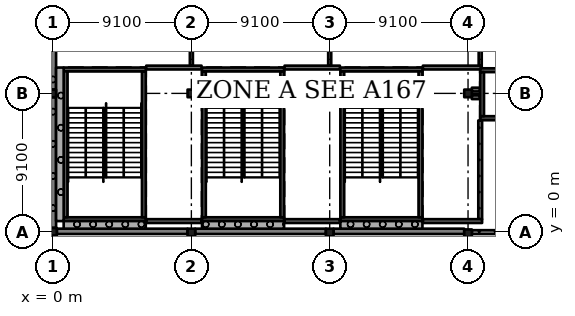
"""IFC4 building model, lengths in metres.
Left out: names, types, materials, properties, quantities, classifications, styles, units other than length and angle.
Written with IfcOpenShell. Run it as: python <this file> out.ifc"""

import sys

from ifc_helpers import new_model, si_unit, direction, frame, frame_2d, origin, origin_2d, place, context, subcontext, project, spatial, rectangle, extrude, element, fill, save


model = new_model("IFC4")
c1 = context("Model", 3, precision=1e-05, world=origin(), true_north=direction((0.0, 1.0)))
c2 = subcontext(c1, "Body", "Model", "MODEL_VIEW")
j1 = project(units=[si_unit("LENGTHUNIT", "METRE"), si_unit("PLANEANGLEUNIT", "RADIAN")], contexts=[c1])
p1 = place(None, origin())
s1 = spatial("IfcSite", under=j1, at=p1, CompositionType="ELEMENT")
p2 = place(p1, origin())
s2 = spatial("IfcBuilding", under=s1, at=p2, CompositionType="ELEMENT")
p3 = place(p2, frame((0.0, 0.0, 24.57)))
s3 = spatial("IfcBuildingStorey", under=s2, at=p3, CompositionType="ELEMENT", Elevation=24.57)
for number, where, z_axis, x_axis in (
    (1, (0.0, 0.0, 0.0), (0.0, 0.0, 1.0), (1.0, 0.0, 0.0)),
    (2, (-0.05, 9.1, 0.0), (0.0, 0.0, 1.0), (1.0, 0.0, 0.0)),
    (3, (9.1, -0.05, 0.0), (0.0, 0.0, 1.0), (1.0, 0.0, 0.0)),
    (4, (9.1, 9.1, 0.0), (0.0, 0.0, 1.0), (1.0, 0.0, 0.0)),
    (5, (18.2, -0.05, 0.0), (0.0, 0.0, 1.0), (1.0, 0.0, 0.0)),
    (6, (18.2, 9.1, 0.0), (0.0, 0.0, 1.0), (1.0, 0.0, 0.0)),
    (7, (27.3, -0.1, 0.0), (0.0, 0.0, 1.0), (1.0, 0.0, 0.0)),
    (8, (27.3, 9.1, 0.0), (0.0, 0.0, 1.0), (1.0, 0.0, 0.0)),
):
    element("IfcColumn", number, at=place(p3, frame(where, z_axis=z_axis, x_axis=x_axis)), inside=s3, PredefinedType="COLUMN", context=c2, shape_type="SweptSolid", body=[
        extrude(rectangle(XDim=0.5, YDim=0.5, at=origin_2d()), origin(), (0.0, 0.0, 1.0), 4.55),
    ])
p4 = place(p3, frame((30.7, 7.475, 0.0), z_axis=(0.0, 0.0, 1.0), x_axis=(-1.0, 0.0, 0.0)))
e9 = element("IfcWall", 9, at=p4, inside=s3, PredefinedType="SHEAR", context=c2, shape_type="SweptSolid", body=[
    extrude(rectangle(XDim=2.6, YDim=0.25, at=frame_2d((1.3, 0.0))), origin(), (0.0, 0.0, 1.0), 4.55),
])
p5 = place(p3, frame((30.7, 10.625, 0.0), z_axis=(0.0, 0.0, 1.0), x_axis=(-1.0, 0.0, 0.0)))
e10 = element("IfcWall", 10, at=p5, inside=s3, PredefinedType="SHEAR", context=c2, shape_type="SweptSolid", body=[
    extrude(rectangle(XDim=2.6, YDim=0.25, at=frame_2d((1.3, 0.0))), origin(), (0.0, 0.0, 1.0), 4.55),
])
p6 = place(p5, frame((0.8, 0.0, 0.0)))
e11 = element("IfcOpeningElement", 11, at=p6, cuts=e10, PredefinedType="OPENING", context=c2, shape_type="SweptSolid", body=[
    extrude(rectangle(XDim=1.0, YDim=2.1, at=frame_2d((0.5, 1.05))), frame((0.0, 0.135, 0.0), z_axis=(0.0, -1.0, 0.0), x_axis=(1.0, 0.0, 0.0)), (0.0, 0.0, 1.0), 0.27),
])
p7 = place(p3, frame((28.225, 10.5, 0.0), z_axis=(0.0, 0.0, 1.0), x_axis=(0.0, -1.0, 0.0)))
e12 = element("IfcWall", 12, at=p7, inside=s3, PredefinedType="SHEAR", context=c2, shape_type="SweptSolid", body=[
    extrude(rectangle(XDim=2.9, YDim=0.25, at=frame_2d((1.45, 0.0))), origin(), (0.0, 0.0, 1.0), 4.55),
])
p8 = place(p3, frame((6.1, 0.825, 0.0), z_axis=(0.0, 0.0, 1.0), x_axis=(-1.0, 0.0, 0.0)))
e13 = element("IfcWall", 13, at=p8, inside=s3, PredefinedType="SHEAR", context=c2, shape_type="SweptSolid", body=[
    extrude(rectangle(XDim=5.4, YDim=0.25, at=frame_2d((2.7, 0.0))), origin(), (0.0, 0.0, 1.0), 4.55),
])
p9 = place(p3, frame((6.1, 10.675, 0.0), z_axis=(0.0, 0.0, 1.0), x_axis=(-1.0, 0.0, 0.0)))
e14 = element("IfcWall", 14, at=p9, inside=s3, PredefinedType="SHEAR", context=c2, shape_type="SweptSolid", body=[
    extrude(rectangle(XDim=5.4, YDim=0.25, at=frame_2d((2.7, 0.0))), origin(), (0.0, 0.0, 1.0), 4.55),
])
p10 = place(p9, frame((1.5, 0.0, 0.0)))
e15 = element("IfcOpeningElement", 15, at=p10, cuts=e14, PredefinedType="OPENING", context=c2, shape_type="SweptSolid", body=[
    extrude(rectangle(XDim=2.4, YDim=2.1, at=frame_2d((1.2, 1.05))), frame((0.0, 0.135, 0.0), z_axis=(0.0, -1.0, 0.0), x_axis=(1.0, 0.0, 0.0)), (0.0, 0.0, 1.0), 0.27),
])
for number, where, z_axis, x_axis in (
    (16, (0.825, 10.55, 0.0), (0.0, 0.0, 1.0), (0.0, -1.0, 0.0)),
    (17, (5.975, 10.55, 0.0), (0.0, 0.0, 1.0), (0.0, -1.0, 0.0)),
):
    element("IfcWall", number, at=place(p3, frame(where, z_axis=z_axis, x_axis=x_axis)), inside=s3, PredefinedType="SHEAR", context=c2, shape_type="SweptSolid", body=[
        extrude(rectangle(XDim=9.6, YDim=0.25, at=frame_2d((4.8, 0.0))), origin(), (0.0, 0.0, 1.0), 4.55),
    ])
p11 = place(p3, frame((15.2, 0.825, 0.0), z_axis=(0.0, 0.0, 1.0), x_axis=(-1.0, 0.0, 0.0)))
e18 = element("IfcWall", 18, at=p11, inside=s3, PredefinedType="SHEAR", context=c2, shape_type="SweptSolid", body=[
    extrude(rectangle(XDim=5.4, YDim=0.25, at=frame_2d((2.7, 0.0))), origin(), (0.0, 0.0, 1.0), 4.55),
])
p12 = place(p3, frame((15.2, 10.675, 0.0), z_axis=(0.0, 0.0, 1.0), x_axis=(-1.0, 0.0, 0.0)))
e19 = element("IfcWall", 19, at=p12, inside=s3, PredefinedType="SHEAR", context=c2, shape_type="SweptSolid", body=[
    extrude(rectangle(XDim=5.4, YDim=0.25, at=frame_2d((2.7, 0.0))), origin(), (0.0, 0.0, 1.0), 4.55),
])
p13 = place(p12, frame((1.5, 0.0, 0.0)))
e20 = element("IfcOpeningElement", 20, at=p13, cuts=e19, PredefinedType="OPENING", context=c2, shape_type="SweptSolid", body=[
    extrude(rectangle(XDim=2.4, YDim=2.1, at=frame_2d((1.2, 1.05))), frame((0.0, 0.135, 0.0), z_axis=(0.0, -1.0, 0.0), x_axis=(1.0, 0.0, 0.0)), (0.0, 0.0, 1.0), 0.27),
])
for number, where, z_axis, x_axis in (
    (21, (9.925, 10.55, 0.0), (0.0, 0.0, 1.0), (0.0, -1.0, 0.0)),
    (22, (15.075, 10.55, 0.0), (0.0, 0.0, 1.0), (0.0, -1.0, 0.0)),
):
    element("IfcWall", number, at=place(p3, frame(where, z_axis=z_axis, x_axis=x_axis)), inside=s3, PredefinedType="SHEAR", context=c2, shape_type="SweptSolid", body=[
        extrude(rectangle(XDim=9.6, YDim=0.25, at=frame_2d((4.8, 0.0))), origin(), (0.0, 0.0, 1.0), 4.55),
    ])
p14 = place(p3, frame((24.3, 0.825, 0.0), z_axis=(0.0, 0.0, 1.0), x_axis=(-1.0, 0.0, 0.0)))
e23 = element("IfcWall", 23, at=p14, inside=s3, PredefinedType="SHEAR", context=c2, shape_type="SweptSolid", body=[
    extrude(rectangle(XDim=5.4, YDim=0.25, at=frame_2d((2.7, 0.0))), origin(), (0.0, 0.0, 1.0), 4.55),
])
p15 = place(p3, frame((24.3, 10.675, 0.0), z_axis=(0.0, 0.0, 1.0), x_axis=(-1.0, 0.0, 0.0)))
e24 = element("IfcWall", 24, at=p15, inside=s3, PredefinedType="SHEAR", context=c2, shape_type="SweptSolid", body=[
    extrude(rectangle(XDim=5.4, YDim=0.25, at=frame_2d((2.7, 0.0))), origin(), (0.0, 0.0, 1.0), 4.55),
])
p16 = place(p15, frame((1.5, 0.0, 0.0)))
e25 = element("IfcOpeningElement", 25, at=p16, cuts=e24, PredefinedType="OPENING", context=c2, shape_type="SweptSolid", body=[
    extrude(rectangle(XDim=2.4, YDim=2.1, at=frame_2d((1.2, 1.05))), frame((0.0, 0.135, 0.0), z_axis=(0.0, -1.0, 0.0), x_axis=(1.0, 0.0, 0.0)), (0.0, 0.0, 1.0), 0.27),
])
for number, where, z_axis, x_axis in (
    (26, (19.025, 10.55, 0.0), (0.0, 0.0, 1.0), (0.0, -1.0, 0.0)),
    (27, (24.175, 10.55, 0.0), (0.0, 0.0, 1.0), (0.0, -1.0, 0.0)),
):
    element("IfcWall", number, at=place(p3, frame(where, z_axis=z_axis, x_axis=x_axis)), inside=s3, PredefinedType="SHEAR", context=c2, shape_type="SweptSolid", body=[
        extrude(rectangle(XDim=9.6, YDim=0.25, at=frame_2d((4.8, 0.0))), origin(), (0.0, 0.0, 1.0), 4.55),
    ])
p17 = place(p3, frame((0.25, 0.025, 0.0), z_axis=(0.0, 0.0, 1.0), x_axis=(1.0, 0.0, 0.0)))
e28 = element("IfcWall", 28, at=p17, inside=s3, PredefinedType="SOLIDWALL", context=c2, shape_type="SweptSolid", body=[
    extrude(rectangle(XDim=8.6, YDim=0.35, at=frame_2d((4.3, 0.0))), origin(), (0.0, 0.0, 1.0), 3.6),
])
p18 = place(p3, frame((9.35, 0.025, 0.0), z_axis=(0.0, 0.0, 1.0), x_axis=(1.0, 0.0, 0.0)))
e29 = element("IfcWall", 29, at=p18, inside=s3, PredefinedType="SOLIDWALL", context=c2, shape_type="SweptSolid", body=[
    extrude(rectangle(XDim=8.6, YDim=0.35, at=frame_2d((4.3, 0.0))), origin(), (0.0, 0.0, 1.0), 3.6),
])
p19 = place(p3, frame((18.45, 0.025, 0.0), z_axis=(0.0, 0.0, 1.0), x_axis=(1.0, 0.0, 0.0)))
e30 = element("IfcWall", 30, at=p19, inside=s3, PredefinedType="SOLIDWALL", context=c2, shape_type="SweptSolid", body=[
    extrude(rectangle(XDim=8.6, YDim=0.35, at=frame_2d((4.3, 0.0))), origin(), (0.0, 0.0, 1.0), 3.6),
])
p20 = place(p3, frame((27.55, -0.025, 0.0), z_axis=(0.0, 0.0, 1.0), x_axis=(1.0, 0.0, 0.0)))
e31 = element("IfcWall", 31, at=p20, inside=s3, PredefinedType="SOLIDWALL", context=c2, shape_type="SweptSolid", body=[
    extrude(rectangle(XDim=8.6, YDim=0.25, at=frame_2d((4.3, 0.0))), origin(), (0.0, 0.0, 1.0), 3.6),
])
p21 = place(p3, frame((0.025, 17.95, 0.0), z_axis=(0.0, 0.0, 1.0), x_axis=(0.0, -1.0, 0.0)))
e32 = element("IfcWall", 32, at=p21, inside=s3, PredefinedType="SOLIDWALL", context=c2, shape_type="SweptSolid", body=[
    extrude(rectangle(XDim=8.6, YDim=0.35, at=frame_2d((4.3, 0.0))), origin(), (0.0, 0.0, 1.0), 3.6),
])
p22 = place(p3, frame((0.025, 8.85, 0.0), z_axis=(0.0, 0.0, 1.0), x_axis=(0.0, -1.0, 0.0)))
e33 = element("IfcWall", 33, at=p22, inside=s3, PredefinedType="SOLIDWALL", context=c2, shape_type="SweptSolid", body=[
    extrude(rectangle(XDim=8.6, YDim=0.35, at=frame_2d((4.3, 0.0))), origin(), (0.0, 0.0, 1.0), 3.6),
])
p23 = place(p3, frame((0.7, 0.45, 0.0), z_axis=(0.0, 0.0, 1.0), x_axis=(1.0, 0.0, 0.0)))
e34 = element("IfcWall", 34, at=p23, inside=s3, PredefinedType="SOLIDWALL", context=c2, shape_type="SweptSolid", body=[
    extrude(rectangle(XDim=5.4, YDim=0.5, at=frame_2d((2.7, 0.0))), origin(), (0.0, 0.0, 1.0), 4.35),
])
p24 = place(p3, frame((0.45, 0.7, 0.0), z_axis=(0.0, 0.0, 1.0), x_axis=(0.0, 1.0, 0.0)))
e35 = element("IfcWall", 35, at=p24, inside=s3, PredefinedType="SOLIDWALL", context=c2, shape_type="SweptSolid", body=[
    extrude(rectangle(XDim=10.1, YDim=0.5, at=frame_2d((5.05, 0.0))), origin(), (0.0, 0.0, 1.0), 4.35),
])
p25 = place(p3, frame((9.8, 0.45, 0.0), z_axis=(0.0, 0.0, 1.0), x_axis=(1.0, 0.0, 0.0)))
e36 = element("IfcWall", 36, at=p25, inside=s3, PredefinedType="SOLIDWALL", context=c2, shape_type="SweptSolid", body=[
    extrude(rectangle(XDim=5.4, YDim=0.5, at=frame_2d((2.7, 0.0))), origin(), (0.0, 0.0, 1.0), 4.35),
])
p26 = place(p3, frame((18.9, 0.45, 0.0), z_axis=(0.0, 0.0, 1.0), x_axis=(1.0, 0.0, 0.0)))
e37 = element("IfcWall", 37, at=p26, inside=s3, PredefinedType="SOLIDWALL", context=c2, shape_type="SweptSolid", body=[
    extrude(rectangle(XDim=5.4, YDim=0.5, at=frame_2d((2.7, 0.0))), origin(), (0.0, 0.0, 1.0), 4.35),
])
p27 = place(p3, frame((6.13, 10.8, 0.0), z_axis=(0.0, 0.0, 1.0), x_axis=(1.0, 0.0, 0.0)))
e38 = element("IfcWall", 38, at=p27, inside=s3, PredefinedType="SOLIDWALL", context=c2, shape_type="SweptSolid", body=[
    extrude(rectangle(XDim=3.64, YDim=0.25, at=frame_2d((1.82, 0.0))), origin(), (0.0, 0.0, 1.0), 4.35),
])
p28 = place(p27, frame((1.02, 0.0, 0.0)))
e39 = element("IfcOpeningElement", 39, at=p28, cuts=e38, PredefinedType="OPENING", context=c2, shape_type="SweptSolid", body=[
    extrude(rectangle(XDim=1.0, YDim=2.1, at=frame_2d((0.5, 1.05))), frame((0.0, 0.135, 0.0), z_axis=(0.0, -1.0, 0.0), x_axis=(1.0, 0.0, 0.0)), (0.0, 0.0, 1.0), 0.27),
])
p29 = place(p3, frame((9.1, 17.95, 0.0), z_axis=(0.0, 0.0, 1.0), x_axis=(0.0, -1.0, 0.0)))
e40 = element("IfcWall", 40, at=p29, inside=s3, PredefinedType="PARTITIONING", context=c2, shape_type="SweptSolid", body=[
    extrude(rectangle(XDim=7.025, YDim=0.2, at=frame_2d((3.512, 0.0))), origin(), (0.0, 0.0, 1.0), 3.6),
])
p30 = place(p29, frame((0.85, 0.0, 0.0)))
e41 = element("IfcOpeningElement", 41, at=p30, cuts=e40, PredefinedType="OPENING", context=c2, shape_type="SweptSolid", body=[
    extrude(rectangle(XDim=1.8, YDim=2.4, at=frame_2d((0.9, 1.2))), frame((0.0, 0.11, 0.0), z_axis=(0.0, -1.0, 0.0), x_axis=(1.0, 0.0, 0.0)), (0.0, 0.0, 1.0), 0.22),
])
p31 = place(p29, frame((4.35, 0.0, 0.0)))
e42 = element("IfcOpeningElement", 42, at=p31, cuts=e40, PredefinedType="OPENING", context=c2, shape_type="SweptSolid", body=[
    extrude(rectangle(XDim=1.8, YDim=2.4, at=frame_2d((0.9, 1.2))), frame((0.0, 0.11, 0.0), z_axis=(0.0, -1.0, 0.0), x_axis=(1.0, 0.0, 0.0)), (0.0, 0.0, 1.0), 0.22),
])
p32 = place(p3, frame((9.35, 8.85, 0.0), z_axis=(0.0, 0.0, 1.0), x_axis=(1.0, 0.0, 0.0)))
e43 = element("IfcWall", 43, at=p32, inside=s3, PredefinedType="SOLIDWALL", context=c2, shape_type="SweptSolid", body=[
    extrude(rectangle(XDim=0.42, YDim=0.25, at=frame_2d((0.21, 0.0))), origin(), (0.0, 0.0, 1.0), 4.35),
])
p33 = place(p3, frame((9.77, 0.7, 0.0), z_axis=(0.0, 0.0, 1.0), x_axis=(-1.0, 0.0, 0.0)))
e44 = element("IfcWall", 44, at=p33, inside=s3, PredefinedType="SOLIDWALL", context=c2, shape_type="SweptSolid", body=[
    extrude(rectangle(XDim=3.64, YDim=0.25, at=frame_2d((1.82, 0.0))), origin(), (0.0, 0.0, 1.0), 4.35),
])
p34 = place(p3, frame((9.77, 9.35, 0.0), z_axis=(0.0, 0.0, 1.0), x_axis=(-1.0, 0.0, 0.0)))
e45 = element("IfcWall", 45, at=p34, inside=s3, PredefinedType="SOLIDWALL", context=c2, shape_type="SweptSolid", body=[
    extrude(rectangle(XDim=0.42, YDim=0.25, at=frame_2d((0.21, 0.0))), origin(), (0.0, 0.0, 1.0), 4.35),
])
p35 = place(p3, frame((15.23, 10.8, 0.0), z_axis=(0.0, 0.0, 1.0), x_axis=(1.0, 0.0, 0.0)))
e46 = element("IfcWall", 46, at=p35, inside=s3, PredefinedType="SOLIDWALL", context=c2, shape_type="SweptSolid", body=[
    extrude(rectangle(XDim=3.64, YDim=0.25, at=frame_2d((1.82, 0.0))), origin(), (0.0, 0.0, 1.0), 4.35),
])
p36 = place(p35, frame((1.12, 0.0, 0.0)))
e47 = element("IfcOpeningElement", 47, at=p36, cuts=e46, PredefinedType="OPENING", context=c2, shape_type="SweptSolid", body=[
    extrude(rectangle(XDim=0.8, YDim=2.1, at=frame_2d((0.4, 1.05))), frame((0.0, 0.135, 0.0), z_axis=(0.0, -1.0, 0.0), x_axis=(1.0, 0.0, 0.0)), (0.0, 0.0, 1.0), 0.27),
])
p37 = place(p3, frame((18.2, 17.95, 0.0), z_axis=(0.0, 0.0, 1.0), x_axis=(0.0, -1.0, 0.0)))
e48 = element("IfcWall", 48, at=p37, inside=s3, PredefinedType="PARTITIONING", context=c2, shape_type="SweptSolid", body=[
    extrude(rectangle(XDim=7.025, YDim=0.2, at=frame_2d((3.512, 0.0))), origin(), (0.0, 0.0, 1.0), 3.6),
])
p38 = place(p37, frame((0.85, 0.0, 0.0)))
e49 = element("IfcOpeningElement", 49, at=p38, cuts=e48, PredefinedType="OPENING", context=c2, shape_type="SweptSolid", body=[
    extrude(rectangle(XDim=1.8, YDim=2.4, at=frame_2d((0.9, 1.2))), frame((0.0, 0.11, 0.0), z_axis=(0.0, -1.0, 0.0), x_axis=(1.0, 0.0, 0.0)), (0.0, 0.0, 1.0), 0.22),
])
p39 = place(p37, frame((4.35, 0.0, 0.0)))
e50 = element("IfcOpeningElement", 50, at=p39, cuts=e48, PredefinedType="OPENING", context=c2, shape_type="SweptSolid", body=[
    extrude(rectangle(XDim=1.8, YDim=2.4, at=frame_2d((0.9, 1.2))), frame((0.0, 0.11, 0.0), z_axis=(0.0, -1.0, 0.0), x_axis=(1.0, 0.0, 0.0)), (0.0, 0.0, 1.0), 0.22),
])
p40 = place(p3, frame((18.45, 8.85, 0.0), z_axis=(0.0, 0.0, 1.0), x_axis=(1.0, 0.0, 0.0)))
e51 = element("IfcWall", 51, at=p40, inside=s3, PredefinedType="SOLIDWALL", context=c2, shape_type="SweptSolid", body=[
    extrude(rectangle(XDim=0.42, YDim=0.25, at=frame_2d((0.21, 0.0))), origin(), (0.0, 0.0, 1.0), 4.35),
])
p41 = place(p3, frame((18.87, 0.7, 0.0), z_axis=(0.0, 0.0, 1.0), x_axis=(-1.0, 0.0, 0.0)))
e52 = element("IfcWall", 52, at=p41, inside=s3, PredefinedType="SOLIDWALL", context=c2, shape_type="SweptSolid", body=[
    extrude(rectangle(XDim=3.64, YDim=0.25, at=frame_2d((1.82, 0.0))), origin(), (0.0, 0.0, 1.0), 4.35),
])
p42 = place(p3, frame((18.87, 9.35, 0.0), z_axis=(0.0, 0.0, 1.0), x_axis=(-1.0, 0.0, 0.0)))
e53 = element("IfcWall", 53, at=p42, inside=s3, PredefinedType="SOLIDWALL", context=c2, shape_type="SweptSolid", body=[
    extrude(rectangle(XDim=0.42, YDim=0.25, at=frame_2d((0.21, 0.0))), origin(), (0.0, 0.0, 1.0), 4.35),
])
for number, where, z_axis, x_axis in (
    (54, (27.55, 8.85, 0.0), (0.0, 0.0, 1.0), (1.0, 0.0, 0.0)),
    (55, (28.07, 9.35, 0.0), (0.0, 0.0, 1.0), (-1.0, 0.0, 0.0)),
):
    element("IfcWall", number, at=place(p3, frame(where, z_axis=z_axis, x_axis=x_axis)), inside=s3, PredefinedType="SOLIDWALL", context=c2, shape_type="SweptSolid", body=[
        extrude(rectangle(XDim=0.52, YDim=0.25, at=frame_2d((0.26, 0.0))), origin(), (0.0, 0.0, 1.0), 4.35),
    ])
p43 = place(p3, frame((28.1, 7.32, 0.0), z_axis=(0.0, 0.0, 1.0), x_axis=(0.0, -1.0, 0.0)))
e56 = element("IfcWall", 56, at=p43, inside=s3, PredefinedType="SOLIDWALL", context=c2, shape_type="SweptSolid", body=[
    extrude(rectangle(XDim=6.495, YDim=0.25, at=frame_2d((3.248, 0.0))), origin(), (0.0, 0.0, 1.0), 4.35),
])
p44 = place(p3, frame((28.1, 13.7, 0.0), z_axis=(0.0, 0.0, 1.0), x_axis=(0.0, -1.0, 0.0)))
e57 = element("IfcWall", 57, at=p44, inside=s3, PredefinedType="PARTITIONING", context=c2, shape_type="SweptSolid", body=[
    extrude(rectangle(XDim=2.775, YDim=0.2, at=frame_2d((1.387, 0.0))), origin(), (0.0, 0.0, 1.0), 4.35),
])
p45 = place(p44, frame((0.45, 0.0, 0.0)))
e58 = element("IfcOpeningElement", 58, at=p45, cuts=e57, PredefinedType="OPENING", context=c2, shape_type="SweptSolid", body=[
    extrude(rectangle(XDim=1.8, YDim=2.4, at=frame_2d((0.9, 1.2))), frame((0.0, 0.11, 0.0), z_axis=(0.0, -1.0, 0.0), x_axis=(1.0, 0.0, 0.0)), (0.0, 0.0, 1.0), 0.22),
])
p46 = place(p3, frame((28.2, 10.8, 0.0), z_axis=(0.0, 0.0, 1.0), x_axis=(-1.0, 0.0, 0.0)))
e59 = element("IfcWall", 59, at=p46, inside=s3, PredefinedType="SOLIDWALL", context=c2, shape_type="SweptSolid", body=[
    extrude(rectangle(XDim=3.87, YDim=0.25, at=frame_2d((1.935, 0.0))), origin(), (0.0, 0.0, 1.0), 4.35),
])
p47 = place(p46, frame((1.45, 0.0, 0.0)))
e60 = element("IfcOpeningElement", 60, at=p47, cuts=e59, PredefinedType="OPENING", context=c2, shape_type="SweptSolid", body=[
    extrude(rectangle(XDim=1.0, YDim=2.1, at=frame_2d((0.5, 1.05))), frame((0.0, 0.135, 0.0), z_axis=(0.0, -1.0, 0.0), x_axis=(1.0, 0.0, 0.0)), (0.0, 0.0, 1.0), 0.27),
])
p48 = place(p3, frame((28.225, 0.7, 0.0), z_axis=(0.0, 0.0, 1.0), x_axis=(-1.0, 0.0, 0.0)))
e61 = element("IfcWall", 61, at=p48, inside=s3, PredefinedType="SOLIDWALL", context=c2, shape_type="SweptSolid", body=[
    extrude(rectangle(XDim=3.895, YDim=0.25, at=frame_2d((1.948, 0.0))), origin(), (0.0, 0.0, 1.0), 4.35),
])
p49 = place(p28, origin())
e62 = element("IfcDoor", 62, at=p49, inside=s3, OperationType="SINGLE_SWING_RIGHT", PredefinedType="DOOR", context=c2, shape_type="SweptSolid", body=[
    extrude(rectangle(XDim=1.0, YDim=2.1, at=frame_2d((0.5, 1.05))), frame((0.0, 0.025, 0.0), z_axis=(0.0, -1.0, 0.0), x_axis=(1.0, 0.0, 0.0)), (0.0, 0.0, 1.0), 0.05),
])
fill(e39, e62)
p50 = place(p36, origin())
e63 = element("IfcDoor", 63, at=p50, inside=s3, OperationType="SINGLE_SWING_RIGHT", PredefinedType="DOOR", context=c2, shape_type="SweptSolid", body=[
    extrude(rectangle(XDim=0.8, YDim=2.1, at=frame_2d((0.4, 1.05))), frame((0.0, 0.025, 0.0), z_axis=(0.0, -1.0, 0.0), x_axis=(1.0, 0.0, 0.0)), (0.0, 0.0, 1.0), 0.05),
])
fill(e47, e63)
p51 = place(p47, origin())
e64 = element("IfcDoor", 64, at=p51, inside=s3, OperationType="SINGLE_SWING_LEFT", PredefinedType="DOOR", context=c2, shape_type="SweptSolid", body=[
    extrude(rectangle(XDim=1.0, YDim=2.1, at=frame_2d((0.5, 1.05))), frame((0.0, 0.025, 0.0), z_axis=(0.0, -1.0, 0.0), x_axis=(1.0, 0.0, 0.0)), (0.0, 0.0, 1.0), 0.05),
])
fill(e60, e64)
p52 = place(p31, origin())
e65 = element("IfcDoor", 65, at=p52, inside=s3, OperationType="DOUBLE_DOOR_SINGLE_SWING", PredefinedType="DOOR", context=c2, shape_type="SweptSolid", body=[
    extrude(rectangle(XDim=1.8, YDim=2.4, at=frame_2d((0.9, 1.2))), frame((0.0, 0.025, 0.0), z_axis=(0.0, -1.0, 0.0), x_axis=(1.0, 0.0, 0.0)), (0.0, 0.0, 1.0), 0.05),
])
fill(e42, e65)
p53 = place(p39, origin())
e66 = element("IfcDoor", 66, at=p53, inside=s3, OperationType="DOUBLE_DOOR_SINGLE_SWING", PredefinedType="DOOR", context=c2, shape_type="SweptSolid", body=[
    extrude(rectangle(XDim=1.8, YDim=2.4, at=frame_2d((0.9, 1.2))), frame((0.0, 0.025, 0.0), z_axis=(0.0, -1.0, 0.0), x_axis=(1.0, 0.0, 0.0)), (0.0, 0.0, 1.0), 0.05),
])
fill(e50, e66)
p54 = place(p45, origin())
e67 = element("IfcDoor", 67, at=p54, inside=s3, OperationType="DOUBLE_DOOR_SINGLE_SWING", PredefinedType="DOOR", context=c2, shape_type="SweptSolid", body=[
    extrude(rectangle(XDim=1.8, YDim=2.4, at=frame_2d((0.9, 1.2))), frame((0.0, 0.025, 0.0), z_axis=(0.0, -1.0, 0.0), x_axis=(1.0, 0.0, 0.0)), (0.0, 0.0, 1.0), 0.05),
])
fill(e58, e67)
p55 = place(p10, origin())
e68 = element("IfcDoor", 68, at=p55, inside=s3, OperationType="DOUBLE_DOOR_SINGLE_SWING", PredefinedType="DOOR", context=c2, shape_type="SweptSolid", body=[
    extrude(rectangle(XDim=2.4, YDim=2.1, at=frame_2d((1.2, 1.05))), frame((0.0, 0.025, 0.0), z_axis=(0.0, -1.0, 0.0), x_axis=(1.0, 0.0, 0.0)), (0.0, 0.0, 1.0), 0.05),
])
fill(e15, e68)
p56 = place(p13, origin())
e69 = element("IfcDoor", 69, at=p56, inside=s3, OperationType="DOUBLE_DOOR_SINGLE_SWING", PredefinedType="DOOR", context=c2, shape_type="SweptSolid", body=[
    extrude(rectangle(XDim=2.4, YDim=2.1, at=frame_2d((1.2, 1.05))), frame((0.0, 0.025, 0.0), z_axis=(0.0, -1.0, 0.0), x_axis=(1.0, 0.0, 0.0)), (0.0, 0.0, 1.0), 0.05),
])
fill(e20, e69)
p57 = place(p16, origin())
e70 = element("IfcDoor", 70, at=p57, inside=s3, OperationType="DOUBLE_DOOR_SINGLE_SWING", PredefinedType="DOOR", context=c2, shape_type="SweptSolid", body=[
    extrude(rectangle(XDim=2.4, YDim=2.1, at=frame_2d((1.2, 1.05))), frame((0.0, 0.025, 0.0), z_axis=(0.0, -1.0, 0.0), x_axis=(1.0, 0.0, 0.0)), (0.0, 0.0, 1.0), 0.05),
])
fill(e25, e70)
p58 = place(p6, origin())
e71 = element("IfcDoor", 71, at=p58, inside=s3, OperationType="DOUBLE_DOOR_SLIDING", PredefinedType="DOOR", context=c2, shape_type="SweptSolid", body=[
    extrude(rectangle(XDim=1.0, YDim=2.1, at=frame_2d((0.5, 1.05))), frame((0.0, 0.025, 0.0), z_axis=(0.0, -1.0, 0.0), x_axis=(1.0, 0.0, 0.0)), (0.0, 0.0, 1.0), 0.05),
])
fill(e11, e71)
save(model, sys.argv[1])
